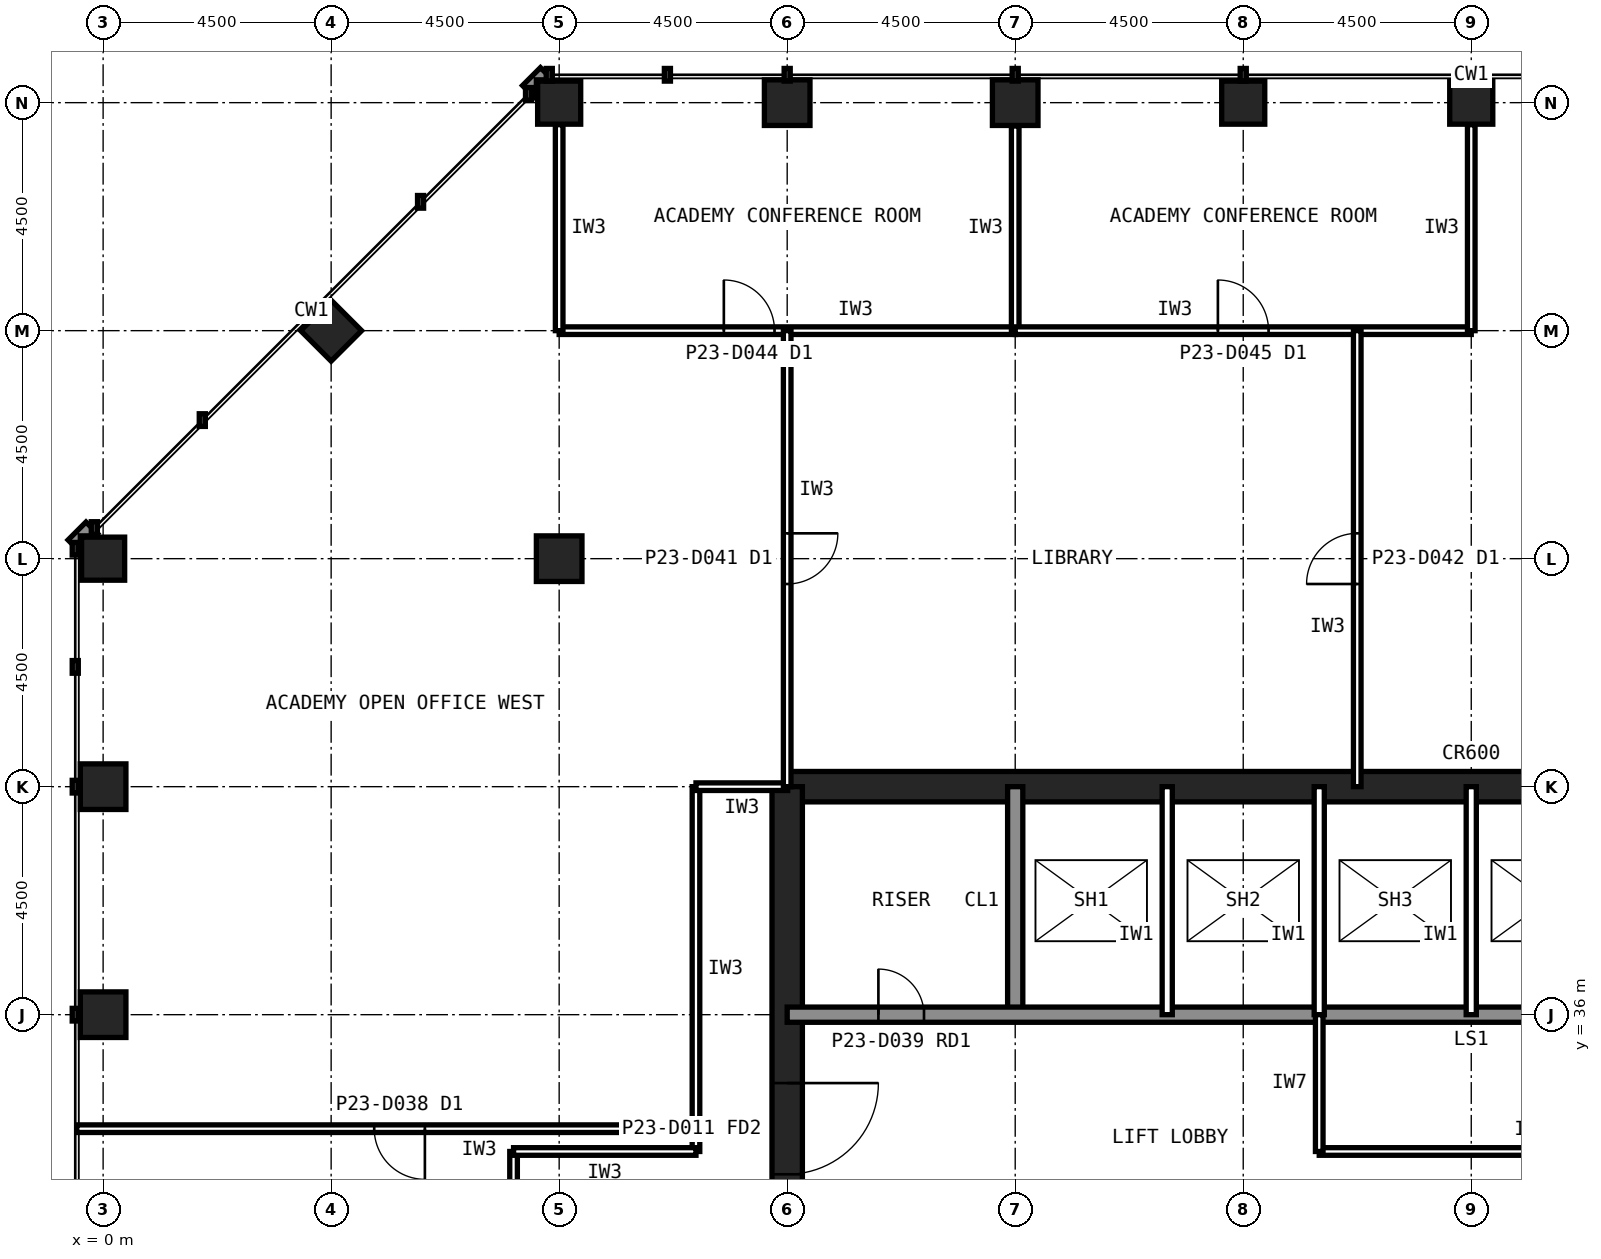
"""IFC4 building model, lengths in metres.
Left out: names, types, materials, properties, quantities, classifications, styles, units other than length and angle.
Written with IfcOpenShell. Run it as: python <this file> out.ifc"""

import sys

from ifc_helpers import new_model, si_unit, direction, frame, frame_2d, origin, origin_2d, place, context, subcontext, project, spatial, rectangle, hollow_rectangle, extrude, element, fill, save


model = new_model("IFC4")
c1 = context("Model", 3, precision=1e-05, world=origin(), true_north=direction((0.0, 1.0)))
c2 = subcontext(c1, "Body", "Model", "MODEL_VIEW")
j1 = project(units=[si_unit("LENGTHUNIT", "METRE"), si_unit("PLANEANGLEUNIT", "RADIAN")], contexts=[c1])
p1 = place(None, origin())
s1 = spatial("IfcSite", under=j1, at=p1, CompositionType="ELEMENT")
p2 = place(p1, origin())
s2 = spatial("IfcBuilding", under=s1, at=p2, CompositionType="ELEMENT")
p3 = place(p2, frame((0.0, 0.0, 96.2)))
s3 = spatial("IfcBuildingStorey", under=s2, at=p3, CompositionType="ELEMENT", Elevation=96.2)
for number, where, z_axis, x_axis in (
    (1, (27.0, 54.0, 0.0), (0.0, 0.0, 1.0), (1.0, 0.0, 0.0)),
    (2, (22.5, 54.0, 0.0), (0.0, 0.0, 1.0), (1.0, 0.0, 0.0)),
):
    element("IfcColumn", number, at=place(p3, frame(where, z_axis=z_axis, x_axis=x_axis)), inside=s3, PredefinedType="COLUMN", context=c2, shape_type="SweptSolid", body=[
        extrude(hollow_rectangle(XDim=0.8, YDim=0.8, WallThickness=0.045, at=origin_2d()), origin(), (0.0, 0.0, 1.0), 4.2),
    ])
p4 = place(p3, frame((18.0, 54.0, 0.0), z_axis=(0.0, 0.0, 1.0), x_axis=(1.0, 0.0, 0.0)))
e3 = element("IfcColumn", 3, at=p4, inside=s3, PredefinedType="COLUMN", context=c2, shape_type="SweptSolid", body=[
    extrude(hollow_rectangle(XDim=0.9, YDim=0.9, WallThickness=0.063, at=origin_2d()), origin(), (0.0, 0.0, 1.0), 4.2),
])
p5 = place(p3, frame((13.5, 54.0, 0.0), z_axis=(0.0, 0.0, 1.0), x_axis=(1.0, 0.0, 0.0)))
e4 = element("IfcColumn", 4, at=p5, inside=s3, PredefinedType="COLUMN", context=c2, shape_type="SweptSolid", body=[
    extrude(hollow_rectangle(XDim=0.85, YDim=0.85, WallThickness=0.05, at=origin_2d()), origin(), (0.0, 0.0, 1.0), 4.2),
])
for number, where, z_axis, x_axis in (
    (5, (9.0, 54.0, 0.0), (0.0, 0.0, 1.0), (1.0, 0.0, 0.0)),
    (6, (0.0, 45.0, 0.0), (0.0, 0.0, 1.0), (1.0, 0.0, 0.0)),
):
    element("IfcColumn", number, at=place(p3, frame(where, z_axis=z_axis, x_axis=x_axis)), inside=s3, PredefinedType="COLUMN", context=c2, shape_type="SweptSolid", body=[
        extrude(hollow_rectangle(XDim=0.8, YDim=0.8, WallThickness=0.045, at=origin_2d()), origin(), (0.0, 0.0, 1.0), 4.2),
    ])
p6 = place(p3, frame((0.0, 40.5, 0.0), z_axis=(0.0, 0.0, 1.0), x_axis=(1.0, 0.0, 0.0)))
e7 = element("IfcColumn", 7, at=p6, inside=s3, PredefinedType="COLUMN", context=c2, shape_type="SweptSolid", body=[
    extrude(hollow_rectangle(XDim=0.85, YDim=0.85, WallThickness=0.05, at=origin_2d()), origin(), (0.0, 0.0, 1.0), 4.2),
])
p7 = place(p3, frame((0.0, 36.0, 0.0), z_axis=(0.0, 0.0, 1.0), x_axis=(1.0, 0.0, 0.0)))
e8 = element("IfcColumn", 8, at=p7, inside=s3, PredefinedType="COLUMN", context=c2, shape_type="SweptSolid", body=[
    extrude(hollow_rectangle(XDim=0.9, YDim=0.9, WallThickness=0.063, at=origin_2d()), origin(), (0.0, 0.0, 1.0), 4.2),
])
p8 = place(p3, frame((4.5, 49.5, 0.0), z_axis=(0.0, 0.0, 1.0), x_axis=(0.707106781187, 0.707106781187, 0.0)))
e9 = element("IfcColumn", 9, at=p8, inside=s3, PredefinedType="COLUMN", context=c2, shape_type="SweptSolid", body=[
    extrude(hollow_rectangle(XDim=0.8, YDim=0.8, WallThickness=0.045, at=origin_2d()), origin(), (0.0, 0.0, 1.0), 4.2),
])
p9 = place(p3, frame((9.0, 45.0, 0.0), z_axis=(0.0, 0.0, 1.0), x_axis=(1.0, 0.0, 0.0)))
e10 = element("IfcColumn", 10, at=p9, inside=s3, PredefinedType="COLUMN", context=c2, shape_type="SweptSolid", body=[
    extrude(hollow_rectangle(XDim=0.9, YDim=0.9, WallThickness=0.063, at=origin_2d()), origin(), (0.0, 0.0, 1.0), 4.2),
])
p10 = place(p3, frame((40.5, 40.5, 0.0), z_axis=(0.0, 0.0, 1.0), x_axis=(-1.0, 0.0, 0.0)))
e11 = element("IfcWall", 11, at=p10, inside=s3, PredefinedType="SHEAR", context=c2, shape_type="SweptSolid", body=[
    extrude(rectangle(XDim=27.0, YDim=0.6, at=frame_2d((13.5, 0.0))), origin(), (0.0, 0.0, 1.0), 4.2),
])
p11 = place(p3, frame((13.5, 40.5, 0.0), z_axis=(0.0, 0.0, 1.0), x_axis=(0.0, -1.0, 0.0)))
e12 = element("IfcWall", 12, at=p11, inside=s3, PredefinedType="SHEAR", context=c2, shape_type="SweptSolid", body=[
    extrude(rectangle(XDim=27.0, YDim=0.6, at=frame_2d((13.5, 0.0))), origin(), (0.0, 0.0, 1.0), 4.2),
])
p12 = place(p11, frame((19.65, 0.0, 0.0)))
e13 = element("IfcOpeningElement", 13, at=p12, cuts=e12, PredefinedType="OPENING", context=c2, shape_type="SweptSolid", body=[
    extrude(rectangle(XDim=1.2, YDim=2.1, at=frame_2d((0.6, 1.05))), frame((0.0, 0.31, 0.0), z_axis=(0.0, -1.0, 0.0), x_axis=(1.0, 0.0, 0.0)), (0.0, 0.0, 1.0), 0.62),
])
p13 = place(p11, frame((5.85, 0.0, 0.0)))
e14 = element("IfcOpeningElement", 14, at=p13, cuts=e12, PredefinedType="OPENING", context=c2, shape_type="SweptSolid", body=[
    extrude(rectangle(XDim=1.8, YDim=2.1, at=frame_2d((0.9, 1.05))), frame((0.0, 0.31, 0.0), z_axis=(0.0, -1.0, 0.0), x_axis=(1.0, 0.0, 0.0)), (0.0, 0.0, 1.0), 0.62),
])
p14 = place(p3, frame((18.0, 36.0, 0.0), z_axis=(0.0, 0.0, 1.0), x_axis=(0.0, 1.0, 0.0)))
e15 = element("IfcWall", 15, at=p14, inside=s3, PredefinedType="SOLIDWALL", context=c2, shape_type="SweptSolid", body=[
    extrude(rectangle(XDim=4.5, YDim=0.3, at=frame_2d((2.25, 0.0))), origin(), (0.0, 0.0, 1.0), 4.04),
])
p15 = place(p3, frame((13.5, 36.0, 0.0), z_axis=(0.0, 0.0, 1.0), x_axis=(1.0, 0.0, 0.0)))
e16 = element("IfcWall", 16, at=p15, inside=s3, PredefinedType="SOLIDWALL", context=c2, shape_type="SweptSolid", body=[
    extrude(rectangle(XDim=27.0, YDim=0.3, at=frame_2d((13.5, 0.0))), origin(), (0.0, 0.0, 1.0), 4.04),
])
p16 = place(p15, frame((1.8, 0.0, 0.0)))
e17 = element("IfcOpeningElement", 17, at=p16, cuts=e16, PredefinedType="OPENING", context=c2, shape_type="SweptSolid", body=[
    extrude(rectangle(XDim=0.9, YDim=2.1, at=frame_2d((0.45, 1.05))), frame((0.0, 0.16, 0.0), z_axis=(0.0, -1.0, 0.0), x_axis=(1.0, 0.0, 0.0)), (0.0, 0.0, 1.0), 0.32),
])
p17 = place(p15, frame((24.1, 0.0, 0.0)))
e18 = element("IfcOpeningElement", 18, at=p17, cuts=e16, PredefinedType="OPENING", context=c2, shape_type="SweptSolid", body=[
    extrude(rectangle(XDim=1.3, YDim=2.2, at=frame_2d((0.65, 1.1))), frame((0.0, 0.16, 0.0), z_axis=(0.0, -1.0, 0.0), x_axis=(1.0, 0.0, 0.0)), (0.0, 0.0, 1.0), 0.32),
])
for number, where, z_axis, x_axis in (
    (19, (21.0, 36.0, 0.0), (0.0, 0.0, 1.0), (0.0, 1.0, 0.0)),
    (20, (24.0, 36.0, 0.0), (0.0, 0.0, 1.0), (0.0, 1.0, 0.0)),
    (21, (27.0, 36.0, 0.0), (0.0, 0.0, 1.0), (0.0, 1.0, 0.0)),
):
    element("IfcWall", number, at=place(p3, frame(where, z_axis=z_axis, x_axis=x_axis)), inside=s3, PredefinedType="PARTITIONING", context=c2, shape_type="SweptSolid", body=[
        extrude(rectangle(XDim=4.5, YDim=0.2, at=frame_2d((2.25, 0.0))), origin(), (0.0, 0.0, 1.0), 4.04),
    ])
p18 = place(p3, frame((18.0, 33.3, 0.0), z_axis=(0.0, 0.0, 1.0), x_axis=(1.0, 0.0, 0.0)))
e22 = element("IfcWall", 22, at=p18, inside=s3, PredefinedType="PARTITIONING", context=c2, shape_type="SweptSolid", body=[
    extrude(rectangle(XDim=18.0, YDim=0.15, at=frame_2d((9.0, 0.0))), origin(), (0.0, 0.0, 1.0), 4.04),
])
p19 = place(p18, frame((1.8, 0.0, 0.0)))
e23 = element("IfcOpeningElement", 23, at=p19, cuts=e22, PredefinedType="OPENING", context=c2, shape_type="SweptSolid", body=[
    extrude(rectangle(XDim=0.9, YDim=2.1, at=frame_2d((0.45, 1.05))), frame((0.0, 0.085, 0.0), z_axis=(0.0, -1.0, 0.0), x_axis=(1.0, 0.0, 0.0)), (0.0, 0.0, 1.0), 0.17),
])
p20 = place(p18, frame((7.8, 0.0, 0.0)))
e24 = element("IfcOpeningElement", 24, at=p20, cuts=e22, PredefinedType="OPENING", context=c2, shape_type="SweptSolid", body=[
    extrude(rectangle(XDim=0.9, YDim=2.1, at=frame_2d((0.45, 1.05))), frame((0.0, 0.085, 0.0), z_axis=(0.0, -1.0, 0.0), x_axis=(1.0, 0.0, 0.0)), (0.0, 0.0, 1.0), 0.17),
])
p21 = place(p18, frame((14.55, 0.0, 0.0)))
e25 = element("IfcOpeningElement", 25, at=p21, cuts=e22, PredefinedType="OPENING", context=c2, shape_type="SweptSolid", body=[
    extrude(rectangle(XDim=0.9, YDim=2.1, at=frame_2d((0.45, 1.05))), frame((0.0, 0.085, 0.0), z_axis=(0.0, -1.0, 0.0), x_axis=(1.0, 0.0, 0.0)), (0.0, 0.0, 1.0), 0.17),
])
for number, where, z_axis, x_axis in (
    (26, (18.0, 33.3, 0.0), (0.0, 0.0, 1.0), (0.0, 1.0, 0.0)),
    (27, (22.5, 33.3, 0.0), (0.0, 0.0, 1.0), (0.0, 1.0, 0.0)),
):
    element("IfcWall", number, at=place(p3, frame(where, z_axis=z_axis, x_axis=x_axis)), inside=s3, PredefinedType="PARTITIONING", context=c2, shape_type="SweptSolid", body=[
        extrude(rectangle(XDim=2.7, YDim=0.15, at=frame_2d((1.35, 0.0))), origin(), (0.0, 0.0, 1.0), 4.04),
    ])
p22 = place(p3, frame((42.3, 42.3, 0.0), z_axis=(0.0, 0.0, 1.0), x_axis=(-1.0, 0.0, 0.0)))
e28 = element("IfcWall", 28, at=p22, inside=s3, PredefinedType="PARTITIONING", context=c2, shape_type="SweptSolid", body=[
    extrude(rectangle(XDim=30.6, YDim=0.15, at=frame_2d((15.3, 0.0))), origin(), (0.0, 0.0, 1.0), 4.04),
])
p23 = place(p22, frame((14.8, 0.0, 0.0)))
e29 = element("IfcOpeningElement", 29, at=p23, cuts=e28, PredefinedType="OPENING", context=c2, shape_type="SweptSolid", body=[
    extrude(rectangle(XDim=1.0, YDim=2.1, at=frame_2d((0.5, 1.05))), frame((0.0, 0.085, 0.0), z_axis=(0.0, -1.0, 0.0), x_axis=(1.0, 0.0, 0.0)), (0.0, 0.0, 1.0), 0.17),
])
p24 = place(p3, frame((8.1, 33.3, 0.0), z_axis=(0.0, 0.0, 1.0), x_axis=(0.0, -1.0, 0.0)))
e30 = element("IfcWall", 30, at=p24, inside=s3, PredefinedType="PARTITIONING", context=c2, shape_type="SweptSolid", body=[
    extrude(rectangle(XDim=12.6, YDim=0.15, at=frame_2d((6.3, 0.0))), origin(), (0.0, 0.0, 1.0), 4.04),
])
p25 = place(p24, frame((5.8, 0.0, 0.0)))
e31 = element("IfcOpeningElement", 31, at=p25, cuts=e30, PredefinedType="OPENING", context=c2, shape_type="SweptSolid", body=[
    extrude(rectangle(XDim=1.0, YDim=2.1, at=frame_2d((0.5, 1.05))), frame((0.0, 0.085, 0.0), z_axis=(0.0, -1.0, 0.0), x_axis=(1.0, 0.0, 0.0)), (0.0, 0.0, 1.0), 0.17),
])
p26 = place(p3, frame((11.7, 42.3, 0.0), z_axis=(0.0, 0.0, 1.0), x_axis=(0.0, -1.0, 0.0)))
e32 = element("IfcWall", 32, at=p26, inside=s3, PredefinedType="PARTITIONING", context=c2, shape_type="SweptSolid", body=[
    extrude(rectangle(XDim=9.0, YDim=0.15, at=frame_2d((4.5, 0.0))), origin(), (0.0, 0.0, 1.0), 4.04),
])
p27 = place(p3, frame((11.7, 33.3, 0.0), z_axis=(0.0, 0.0, 1.0), x_axis=(-1.0, 0.0, 0.0)))
e33 = element("IfcWall", 33, at=p27, inside=s3, PredefinedType="PARTITIONING", context=c2, shape_type="SweptSolid", body=[
    extrude(rectangle(XDim=3.6, YDim=0.15, at=frame_2d((1.8, 0.0))), origin(), (0.0, 0.0, 1.0), 4.04),
])
p28 = place(p3, frame((9.0, 49.5, 0.0), z_axis=(0.0, 0.0, 1.0), x_axis=(1.0, 0.0, 0.0)))
e34 = element("IfcWall", 34, at=p28, inside=s3, PredefinedType="PARTITIONING", context=c2, shape_type="SweptSolid", body=[
    extrude(rectangle(XDim=9.0, YDim=0.15, at=frame_2d((4.5, 0.0))), origin(), (0.0, 0.0, 1.0), 4.04),
])
p29 = place(p28, frame((3.25, 0.0, 0.0)))
e35 = element("IfcOpeningElement", 35, at=p29, cuts=e34, PredefinedType="OPENING", context=c2, shape_type="SweptSolid", body=[
    extrude(rectangle(XDim=1.0, YDim=2.1, at=frame_2d((0.5, 1.05))), frame((0.0, 0.085, 0.0), z_axis=(0.0, -1.0, 0.0), x_axis=(1.0, 0.0, 0.0)), (0.0, 0.0, 1.0), 0.17),
])
p30 = place(p3, frame((18.0, 49.5, 0.0), z_axis=(0.0, 0.0, 1.0), x_axis=(0.0, 1.0, 0.0)))
e36 = element("IfcWall", 36, at=p30, inside=s3, PredefinedType="PARTITIONING", context=c2, shape_type="SweptSolid", body=[
    extrude(rectangle(XDim=4.04, YDim=0.15, at=frame_2d((2.02, 0.0))), origin(), (0.0, 0.0, 1.0), 3.189),
])
p31 = place(p3, frame((9.0, 53.59, 0.0), z_axis=(0.0, 0.0, 1.0), x_axis=(0.0, -1.0, 0.0)))
e37 = element("IfcWall", 37, at=p31, inside=s3, PredefinedType="PARTITIONING", context=c2, shape_type="SweptSolid", body=[
    extrude(rectangle(XDim=4.09, YDim=0.15, at=frame_2d((2.045, 0.0))), origin(), (0.0, 0.0, 1.0), 3.429),
])
p32 = place(p3, frame((18.0, 49.5, 0.0), z_axis=(0.0, 0.0, 1.0), x_axis=(1.0, 0.0, 0.0)))
e38 = element("IfcWall", 38, at=p32, inside=s3, PredefinedType="PARTITIONING", context=c2, shape_type="SweptSolid", body=[
    extrude(rectangle(XDim=9.0, YDim=0.15, at=frame_2d((4.5, 0.0))), origin(), (0.0, 0.0, 1.0), 4.04),
])
p33 = place(p32, frame((4.0, 0.0, 0.0)))
e39 = element("IfcOpeningElement", 39, at=p33, cuts=e38, PredefinedType="OPENING", context=c2, shape_type="SweptSolid", body=[
    extrude(rectangle(XDim=1.0, YDim=2.1, at=frame_2d((0.5, 1.05))), frame((0.0, 0.085, 0.0), z_axis=(0.0, -1.0, 0.0), x_axis=(1.0, 0.0, 0.0)), (0.0, 0.0, 1.0), 0.17),
])
p34 = place(p3, frame((27.0, 49.5, 0.0), z_axis=(0.0, 0.0, 1.0), x_axis=(0.0, 1.0, 0.0)))
e40 = element("IfcWall", 40, at=p34, inside=s3, PredefinedType="PARTITIONING", context=c2, shape_type="SweptSolid", body=[
    extrude(rectangle(XDim=4.09, YDim=0.15, at=frame_2d((2.045, 0.0))), origin(), (0.0, 0.0, 1.0), 3.189),
])
p35 = place(p3, frame((24.75, 42.3, 0.0), z_axis=(0.0, 0.0, 1.0), x_axis=(0.0, 1.0, 0.0)))
e41 = element("IfcWall", 41, at=p35, inside=s3, PredefinedType="PARTITIONING", context=c2, shape_type="SweptSolid", body=[
    extrude(rectangle(XDim=7.2, YDim=0.15, at=frame_2d((3.6, 0.0))), origin(), (0.0, 0.0, 1.0), 4.04),
])
p36 = place(p35, frame((3.1, 0.0, 0.0)))
e42 = element("IfcOpeningElement", 42, at=p36, cuts=e41, PredefinedType="OPENING", context=c2, shape_type="SweptSolid", body=[
    extrude(rectangle(XDim=1.0, YDim=2.1, at=frame_2d((0.5, 1.05))), frame((0.0, 0.085, 0.0), z_axis=(0.0, -1.0, 0.0), x_axis=(1.0, 0.0, 0.0)), (0.0, 0.0, 1.0), 0.17),
])
p37 = place(p3, frame((13.5, 49.5, 0.0), z_axis=(0.0, 0.0, 1.0), x_axis=(0.0, -1.0, 0.0)))
e43 = element("IfcWall", 43, at=p37, inside=s3, PredefinedType="PARTITIONING", context=c2, shape_type="SweptSolid", body=[
    extrude(rectangle(XDim=7.2, YDim=0.15, at=frame_2d((3.6, 0.0))), origin(), (0.0, 0.0, 1.0), 3.189),
])
p38 = place(p37, frame((3.1, 0.0, 0.0)))
e44 = element("IfcOpeningElement", 44, at=p38, cuts=e43, PredefinedType="OPENING", context=c2, shape_type="SweptSolid", body=[
    extrude(rectangle(XDim=1.0, YDim=2.1, at=frame_2d((0.5, 1.05))), frame((0.0, 0.085, 0.0), z_axis=(0.0, -1.0, 0.0), x_axis=(1.0, 0.0, 0.0)), (0.0, 0.0, 1.0), 0.17),
])
p39 = place(p3, frame((11.7, 33.75, 0.0), z_axis=(0.0, 0.0, 1.0), x_axis=(-1.0, 0.0, 0.0)))
e45 = element("IfcWall", 45, at=p39, inside=s3, PredefinedType="PARTITIONING", context=c2, shape_type="SweptSolid", body=[
    extrude(rectangle(XDim=12.22, YDim=0.15, at=frame_2d((6.11, 0.0))), origin(), (0.0, 0.0, 1.0), 4.04),
])
p40 = place(p39, frame((5.35, 0.0, 0.0)))
e46 = element("IfcOpeningElement", 46, at=p40, cuts=e45, PredefinedType="OPENING", context=c2, shape_type="SweptSolid", body=[
    extrude(rectangle(XDim=1.0, YDim=2.1, at=frame_2d((0.5, 1.05))), frame((0.0, 0.085, 0.0), z_axis=(0.0, -1.0, 0.0), x_axis=(1.0, 0.0, 0.0)), (0.0, 0.0, 1.0), 0.17),
])
p41 = place(p13, origin())
e47 = element("IfcDoor", 47, at=p41, inside=s3, OperationType="SINGLE_SWING_LEFT", PredefinedType="DOOR", context=c2, shape_type="SweptSolid", body=[
    extrude(rectangle(XDim=1.8, YDim=2.1, at=frame_2d((0.9, 1.05))), frame((0.0, 0.025, 0.0), z_axis=(0.0, -1.0, 0.0), x_axis=(1.0, 0.0, 0.0)), (0.0, 0.0, 1.0), 0.05),
])
fill(e14, e47)
p42 = place(p16, origin())
e48 = element("IfcDoor", 48, at=p42, inside=s3, OperationType="SINGLE_SWING_LEFT", PredefinedType="DOOR", context=c2, shape_type="SweptSolid", body=[
    extrude(rectangle(XDim=0.9, YDim=2.1, at=frame_2d((0.45, 1.05))), frame((0.0, 0.025, 0.0), z_axis=(0.0, -1.0, 0.0), x_axis=(1.0, 0.0, 0.0)), (0.0, 0.0, 1.0), 0.05),
])
fill(e17, e48)
p43 = place(p19, origin())
e49 = element("IfcDoor", 49, at=p43, inside=s3, OperationType="SINGLE_SWING_LEFT", PredefinedType="DOOR", context=c2, shape_type="SweptSolid", body=[
    extrude(rectangle(XDim=0.9, YDim=2.1, at=frame_2d((0.45, 1.05))), frame((0.0, 0.025, 0.0), z_axis=(0.0, -1.0, 0.0), x_axis=(1.0, 0.0, 0.0)), (0.0, 0.0, 1.0), 0.05),
])
fill(e23, e49)
p44 = place(p20, origin())
e50 = element("IfcDoor", 50, at=p44, inside=s3, OperationType="SINGLE_SWING_LEFT", PredefinedType="DOOR", context=c2, shape_type="SweptSolid", body=[
    extrude(rectangle(XDim=0.9, YDim=2.1, at=frame_2d((0.45, 1.05))), frame((0.0, 0.025, 0.0), z_axis=(0.0, -1.0, 0.0), x_axis=(1.0, 0.0, 0.0)), (0.0, 0.0, 1.0), 0.05),
])
fill(e24, e50)
p45 = place(p23, origin())
e51 = element("IfcDoor", 51, at=p45, inside=s3, OperationType="SINGLE_SWING_LEFT", PredefinedType="DOOR", context=c2, shape_type="SweptSolid", body=[
    extrude(rectangle(XDim=1.0, YDim=2.1, at=frame_2d((0.5, 1.05))), frame((0.0, 0.025, 0.0), z_axis=(0.0, -1.0, 0.0), x_axis=(1.0, 0.0, 0.0)), (0.0, 0.0, 1.0), 0.05),
])
fill(e29, e51)
p46 = place(p29, origin())
e52 = element("IfcDoor", 52, at=p46, inside=s3, OperationType="SINGLE_SWING_LEFT", PredefinedType="DOOR", context=c2, shape_type="SweptSolid", body=[
    extrude(rectangle(XDim=1.0, YDim=2.1, at=frame_2d((0.5, 1.05))), frame((0.0, 0.025, 0.0), z_axis=(0.0, -1.0, 0.0), x_axis=(1.0, 0.0, 0.0)), (0.0, 0.0, 1.0), 0.05),
])
fill(e35, e52)
p47 = place(p33, origin())
e53 = element("IfcDoor", 53, at=p47, inside=s3, OperationType="SINGLE_SWING_LEFT", PredefinedType="DOOR", context=c2, shape_type="SweptSolid", body=[
    extrude(rectangle(XDim=1.0, YDim=2.1, at=frame_2d((0.5, 1.05))), frame((0.0, 0.025, 0.0), z_axis=(0.0, -1.0, 0.0), x_axis=(1.0, 0.0, 0.0)), (0.0, 0.0, 1.0), 0.05),
])
fill(e39, e53)
p48 = place(p36, origin())
e54 = element("IfcDoor", 54, at=p48, inside=s3, OperationType="SINGLE_SWING_LEFT", PredefinedType="DOOR", context=c2, shape_type="SweptSolid", body=[
    extrude(rectangle(XDim=1.0, YDim=2.1, at=frame_2d((0.5, 1.05))), frame((0.0, 0.025, 0.0), z_axis=(0.0, -1.0, 0.0), x_axis=(1.0, 0.0, 0.0)), (0.0, 0.0, 1.0), 0.05),
])
fill(e42, e54)
p49 = place(p38, origin())
e55 = element("IfcDoor", 55, at=p49, inside=s3, OperationType="SINGLE_SWING_LEFT", PredefinedType="DOOR", context=c2, shape_type="SweptSolid", body=[
    extrude(rectangle(XDim=1.0, YDim=2.1, at=frame_2d((0.5, 1.05))), frame((0.0, 0.025, 0.0), z_axis=(0.0, -1.0, 0.0), x_axis=(1.0, 0.0, 0.0)), (0.0, 0.0, 1.0), 0.05),
])
fill(e44, e55)
p50 = place(p40, origin())
e56 = element("IfcDoor", 56, at=p50, inside=s3, OperationType="SINGLE_SWING_LEFT", PredefinedType="DOOR", context=c2, shape_type="SweptSolid", body=[
    extrude(rectangle(XDim=1.0, YDim=2.1, at=frame_2d((0.5, 1.05))), frame((0.0, 0.025, 0.0), z_axis=(0.0, -1.0, 0.0), x_axis=(1.0, 0.0, 0.0)), (0.0, 0.0, 1.0), 0.05),
])
fill(e46, e56)
save(model, sys.argv[1])
